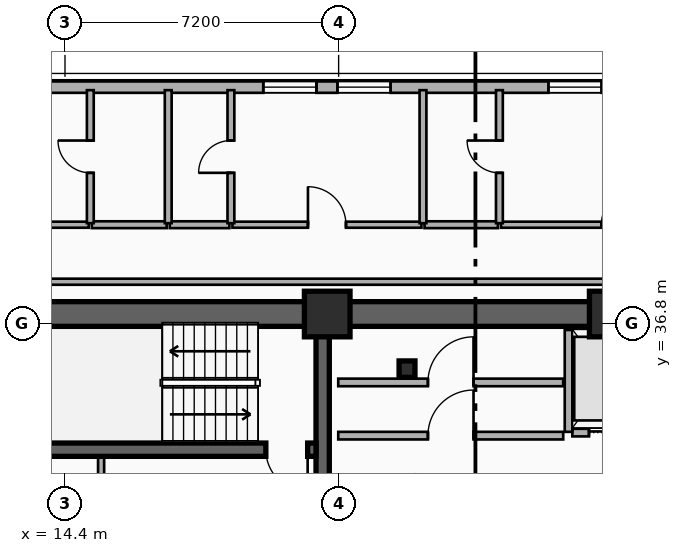
"""IFC4 building model, lengths in metres.
Left out: names, types, materials, properties, quantities, classifications, styles, units other than length and angle.
Written with IfcOpenShell. Run it as: python <this file> out.ifc"""

import sys

from ifc_helpers import new_model, si_unit, direction, frame, frame_2d, origin, origin_2d, place, context, subcontext, project, spatial, rectangle, i_section, extrude, element, fill, save


model = new_model("IFC4")
c1 = context("Model", 3, precision=1e-05, world=origin(), true_north=direction((0.0, 1.0)))
c2 = subcontext(c1, "Body", "Model", "MODEL_VIEW")
j1 = project(units=[si_unit("LENGTHUNIT", "METRE"), si_unit("PLANEANGLEUNIT", "RADIAN")], contexts=[c1])
p1 = place(None, origin())
s1 = spatial("IfcSite", under=j1, at=p1, CompositionType="ELEMENT")
p2 = place(p1, origin())
s2 = spatial("IfcBuilding", under=s1, at=p2, CompositionType="ELEMENT")
p3 = place(p2, frame((0.0, 0.0, 94.3)))
s3 = spatial("IfcBuildingStorey", under=s2, at=p3, CompositionType="ELEMENT", Elevation=94.3)
p4 = place(p3, frame((12.15, 37.05, 0.0), z_axis=(0.0, 0.0, 1.0), x_axis=(1.0, 0.0, 0.0)))
e1 = element("IfcWall", 1, at=p4, inside=s3, PredefinedType="SHEAR", context=c2, shape_type="SweptSolid", body=[
    extrude(rectangle(XDim=33.23, YDim=0.65, at=frame_2d((16.615, 0.0))), origin(), (0.0, 0.0, 1.0), 3.5),
])
p5 = place(p3, frame((21.18, 28.145, 0.0), z_axis=(0.0, 0.0, 1.0), x_axis=(0.0, 1.0, 0.0)))
e2 = element("IfcWall", 2, at=p5, inside=s3, PredefinedType="SHEAR", context=c2, shape_type="SweptSolid", body=[
    extrude(rectangle(XDim=8.58, YDim=0.35, at=frame_2d((4.29, 0.0))), origin(), (0.0, 0.0, 1.0), 3.5),
])
p6 = place(p3, frame((21.005, 33.48, 0.0), z_axis=(0.0, 0.0, 1.0), x_axis=(-1.0, 0.0, 0.0)))
e3 = element("IfcWall", 3, at=p6, inside=s3, PredefinedType="SHEAR", context=c2, shape_type="SweptSolid", body=[
    extrude(rectangle(XDim=8.53, YDim=0.35, at=frame_2d((4.265, 0.0))), origin(), (0.0, 0.0, 1.0), 3.5),
])
p7 = place(p6, frame((0.22, 0.0, 0.0)))
e4 = element("IfcOpeningElement", 4, at=p7, cuts=e3, PredefinedType="OPENING", context=c2, shape_type="SweptSolid", body=[
    extrude(rectangle(XDim=1.1, YDim=2.15, at=frame_2d((0.55, 1.075))), frame((0.0, 0.185, 0.0), z_axis=(0.0, -1.0, 0.0), x_axis=(1.0, 0.0, 0.0)), (0.0, 0.0, 1.0), 0.37),
])
p8 = place(p3, frame((23.4, 35.6, 0.0), z_axis=(0.0, 0.0, 1.0), x_axis=(1.0, 0.0, 0.0)))
e5 = element("IfcColumn", 5, at=p8, inside=s3, PredefinedType="COLUMN", context=c2, shape_type="SweptSolid", body=[
    extrude(i_section(OverallWidth=0.418, OverallDepth=0.432, WebThickness=0.035, FlangeThickness=0.056, FilletRadius=0.015, at=origin_2d()), origin(), (0.0, 0.0, 1.0), 3.5),
])
for number, where, z_axis, x_axis in (
    (6, (21.3, 37.05, 0.0), (0.0, 0.0, 1.0), (1.0, 0.0, 0.0)),
    (7, (28.8, 37.05, 0.0), (0.0, 0.0, 1.0), (1.0, 0.0, 0.0)),
):
    element("IfcColumn", number, at=place(p3, frame(where, z_axis=z_axis, x_axis=x_axis)), inside=s3, PredefinedType="COLUMN", context=c2, shape_type="SweptSolid", body=[
        extrude(rectangle(XDim=1.2, YDim=1.2, at=origin_2d()), origin(), (0.0, 0.0, 1.0), 3.5),
    ])
p9 = place(p3, frame((4.2, 43.02, 0.0), z_axis=(0.0, 0.0, 1.0), x_axis=(1.0, 0.0, 0.0)))
e8 = element("IfcWall", 8, at=p9, inside=s3, PredefinedType="SOLIDWALL", context=c2, shape_type="SweptSolid", body=[
    extrude(rectangle(XDim=49.2, YDim=0.3, at=frame_2d((24.6, 0.0))), origin(), (0.0, 0.0, 1.0), 3.24),
])
p10 = place(p9, frame((4.695, 0.0, 0.85)))
e9 = element("IfcOpeningElement", 9, at=p10, cuts=e8, PredefinedType="OPENING", context=c2, shape_type="SweptSolid", body=[
    extrude(rectangle(XDim=1.4, YDim=1.8, at=frame_2d((0.7, 0.9))), frame((0.0, 0.16, 0.0), z_axis=(0.0, -1.0, 0.0), x_axis=(1.0, 0.0, 0.0)), (0.0, 0.0, 1.0), 0.32),
])
p11 = place(p9, frame((7.631, 0.0, 0.85)))
e10 = element("IfcOpeningElement", 10, at=p11, cuts=e8, PredefinedType="OPENING", context=c2, shape_type="SweptSolid", body=[
    extrude(rectangle(XDim=1.4, YDim=1.8, at=frame_2d((0.7, 0.9))), frame((0.0, 0.16, 0.0), z_axis=(0.0, -1.0, 0.0), x_axis=(1.0, 0.0, 0.0)), (0.0, 0.0, 1.0), 0.32),
])
p12 = place(p9, frame((15.417, 0.0, 0.85)))
e11 = element("IfcOpeningElement", 11, at=p12, cuts=e8, PredefinedType="OPENING", context=c2, shape_type="SweptSolid", body=[
    extrude(rectangle(XDim=1.4, YDim=1.8, at=frame_2d((0.7, 0.9))), frame((0.0, 0.16, 0.0), z_axis=(0.0, -1.0, 0.0), x_axis=(1.0, 0.0, 0.0)), (0.0, 0.0, 1.0), 0.32),
])
p13 = place(p9, frame((17.369, 0.0, 0.85)))
e12 = element("IfcOpeningElement", 12, at=p13, cuts=e8, PredefinedType="OPENING", context=c2, shape_type="SweptSolid", body=[
    extrude(rectangle(XDim=1.4, YDim=1.8, at=frame_2d((0.7, 0.9))), frame((0.0, 0.16, 0.0), z_axis=(0.0, -1.0, 0.0), x_axis=(1.0, 0.0, 0.0)), (0.0, 0.0, 1.0), 0.32),
])
p14 = place(p9, frame((22.921, 0.0, 0.85)))
e13 = element("IfcOpeningElement", 13, at=p14, cuts=e8, PredefinedType="OPENING", context=c2, shape_type="SweptSolid", body=[
    extrude(rectangle(XDim=1.4, YDim=1.8, at=frame_2d((0.7, 0.9))), frame((0.0, 0.16, 0.0), z_axis=(0.0, -1.0, 0.0), x_axis=(1.0, 0.0, 0.0)), (0.0, 0.0, 1.0), 0.32),
])
p15 = place(p9, frame((25.31, 0.0, 0.85)))
e14 = element("IfcOpeningElement", 14, at=p15, cuts=e8, PredefinedType="OPENING", context=c2, shape_type="SweptSolid", body=[
    extrude(rectangle(XDim=1.4, YDim=1.8, at=frame_2d((0.7, 0.9))), frame((0.0, 0.16, 0.0), z_axis=(0.0, -1.0, 0.0), x_axis=(1.0, 0.0, 0.0)), (0.0, 0.0, 1.0), 0.32),
])
p16 = place(p9, frame((29.835, 0.0, 0.85)))
e15 = element("IfcOpeningElement", 15, at=p16, cuts=e8, PredefinedType="OPENING", context=c2, shape_type="SweptSolid", body=[
    extrude(rectangle(XDim=1.4, YDim=1.8, at=frame_2d((0.7, 0.9))), frame((0.0, 0.16, 0.0), z_axis=(0.0, -1.0, 0.0), x_axis=(1.0, 0.0, 0.0)), (0.0, 0.0, 1.0), 0.32),
])
p17 = place(p9, frame((32.771, 0.0, 0.85)))
e16 = element("IfcOpeningElement", 16, at=p17, cuts=e8, PredefinedType="OPENING", context=c2, shape_type="SweptSolid", body=[
    extrude(rectangle(XDim=1.4, YDim=1.8, at=frame_2d((0.7, 0.9))), frame((0.0, 0.16, 0.0), z_axis=(0.0, -1.0, 0.0), x_axis=(1.0, 0.0, 0.0)), (0.0, 0.0, 1.0), 0.32),
])
p18 = place(p9, frame((40.437, 0.0, 0.85)))
e17 = element("IfcOpeningElement", 17, at=p18, cuts=e8, PredefinedType="OPENING", context=c2, shape_type="SweptSolid", body=[
    extrude(rectangle(XDim=1.4, YDim=1.8, at=frame_2d((0.7, 0.9))), frame((0.0, 0.16, 0.0), z_axis=(0.0, -1.0, 0.0), x_axis=(1.0, 0.0, 0.0)), (0.0, 0.0, 1.0), 0.32),
])
p19 = place(p9, frame((42.269, 0.0, 0.85)))
e18 = element("IfcOpeningElement", 18, at=p19, cuts=e8, PredefinedType="OPENING", context=c2, shape_type="SweptSolid", body=[
    extrude(rectangle(XDim=1.4, YDim=1.8, at=frame_2d((0.7, 0.9))), frame((0.0, 0.16, 0.0), z_axis=(0.0, -1.0, 0.0), x_axis=(1.0, 0.0, 0.0)), (0.0, 0.0, 1.0), 0.32),
])
p20 = place(p9, frame((47.115, 0.0, 0.85)))
e19 = element("IfcOpeningElement", 19, at=p20, cuts=e8, PredefinedType="OPENING", context=c2, shape_type="SweptSolid", body=[
    extrude(rectangle(XDim=1.4, YDim=1.8, at=frame_2d((0.7, 0.9))), frame((0.0, 0.16, 0.0), z_axis=(0.0, -1.0, 0.0), x_axis=(1.0, 0.0, 0.0)), (0.0, 0.0, 1.0), 0.32),
])
p21 = place(p3, frame((27.75, 33.93, 0.0), z_axis=(0.0, 0.0, 1.0), x_axis=(1.0, 0.0, 0.0)))
e20 = element("IfcWall", 20, at=p21, inside=s3, PredefinedType="PARTITIONING", context=c2, shape_type="SweptSolid", body=[
    extrude(rectangle(XDim=1.975, YDim=0.2, at=frame_2d((0.988, 0.0))), origin(), (0.0, 0.0, 1.0), 2.212),
])
p22 = place(p21, frame((0.438, 0.0, 0.0)))
e21 = element("IfcOpeningElement", 21, at=p22, cuts=e20, PredefinedType="OPENING", context=c2, shape_type="SweptSolid", body=[
    extrude(rectangle(XDim=1.1, YDim=2.15, at=frame_2d((0.55, 1.075))), frame((0.0, 0.11, 0.0), z_axis=(0.0, -1.0, 0.0), x_axis=(1.0, 0.0, 0.0)), (0.0, 0.0, 1.0), 0.22),
])
p23 = place(p3, frame((27.65, 33.95, 0.0), z_axis=(0.0, 0.0, 1.0), x_axis=(0.0, 1.0, 0.0)))
e22 = element("IfcWall", 22, at=p23, inside=s3, PredefinedType="PARTITIONING", context=c2, shape_type="SweptSolid", body=[
    extrude(rectangle(XDim=2.68, YDim=0.2, at=frame_2d((1.34, 0.0))), origin(), (0.0, 0.0, 1.0), 2.212),
])
p24 = place(p3, frame((21.59, 33.85, 0.0), z_axis=(0.0, 0.0, 1.0), x_axis=(1.0, 0.0, 0.0)))
e23 = element("IfcWall", 23, at=p24, inside=s3, PredefinedType="PARTITIONING", context=c2, shape_type="SweptSolid", body=[
    extrude(rectangle(XDim=5.92, YDim=0.2, at=frame_2d((2.96, 0.0))), origin(), (0.0, 0.0, 1.0), 2.28),
])
p25 = place(p24, frame((2.36, 0.0, 0.0)))
e24 = element("IfcOpeningElement", 24, at=p25, cuts=e23, PredefinedType="OPENING", context=c2, shape_type="SweptSolid", body=[
    extrude(rectangle(XDim=1.2, YDim=2.15, at=frame_2d((0.6, 1.075))), frame((0.0, 0.11, 0.0), z_axis=(0.0, -1.0, 0.0), x_axis=(1.0, 0.0, 0.0)), (0.0, 0.0, 1.0), 0.22),
])
p26 = place(p3, frame((21.59, 35.25, 0.0), z_axis=(0.0, 0.0, 1.0), x_axis=(1.0, 0.0, 0.0)))
e25 = element("IfcWall", 25, at=p26, inside=s3, PredefinedType="PARTITIONING", context=c2, shape_type="SweptSolid", body=[
    extrude(rectangle(XDim=5.92, YDim=0.2, at=frame_2d((2.96, 0.0))), origin(), (0.0, 0.0, 1.0), 2.28),
])
p27 = place(p26, frame((2.36, 0.0, 0.0)))
e26 = element("IfcOpeningElement", 26, at=p27, cuts=e25, PredefinedType="OPENING", context=c2, shape_type="SweptSolid", body=[
    extrude(rectangle(XDim=1.2, YDim=2.15, at=frame_2d((0.6, 1.075))), frame((0.0, 0.11, 0.0), z_axis=(0.0, -1.0, 0.0), x_axis=(1.0, 0.0, 0.0)), (0.0, 0.0, 1.0), 0.22),
])
p28 = place(p3, frame((7.1, 39.4, 0.0), z_axis=(0.0, 0.0, 1.0), x_axis=(1.0, 0.0, 0.0)))
e27 = element("IfcWall", 27, at=p28, inside=s3, PredefinedType="PARTITIONING", context=c2, shape_type="SweptSolid", body=[
    extrude(rectangle(XDim=7.926, YDim=0.16, at=frame_2d((3.963, 0.0))), origin(), (0.0, 0.0, 1.0), 3.24),
])
p29 = place(p28, frame((3.463, 0.0, 0.0)))
e28 = element("IfcOpeningElement", 28, at=p29, cuts=e27, PredefinedType="OPENING", context=c2, shape_type="SweptSolid", body=[
    extrude(rectangle(XDim=1.0, YDim=2.15, at=frame_2d((0.5, 1.075))), frame((0.0, 0.09, 0.0), z_axis=(0.0, -1.0, 0.0), x_axis=(1.0, 0.0, 0.0)), (0.0, 0.0, 1.0), 0.18),
])
p30 = place(p3, frame((15.106, 39.4, 0.0), z_axis=(0.0, 0.0, 1.0), x_axis=(1.0, 0.0, 0.0)))
e29 = element("IfcWall", 29, at=p30, inside=s3, PredefinedType="PLUMBINGWALL", context=c2, shape_type="SweptSolid", body=[
    extrude(rectangle(XDim=1.97, YDim=0.18, at=frame_2d((0.985, 0.0))), origin(), (0.0, 0.0, 1.0), 3.24),
])
p31 = place(p3, frame((18.806, 39.4, 0.0), z_axis=(0.0, 0.0, 1.0), x_axis=(1.0, 0.0, 0.0)))
e30 = element("IfcWall", 30, at=p31, inside=s3, PredefinedType="PARTITIONING", context=c2, shape_type="SweptSolid", body=[
    extrude(rectangle(XDim=4.974, YDim=0.16, at=frame_2d((2.487, 0.0))), origin(), (0.0, 0.0, 1.0), 3.24),
])
p32 = place(p31, frame((1.987, 0.0, 0.0)))
e31 = element("IfcOpeningElement", 31, at=p32, cuts=e30, PredefinedType="OPENING", context=c2, shape_type="SweptSolid", body=[
    extrude(rectangle(XDim=1.0, YDim=2.15, at=frame_2d((0.5, 1.075))), frame((0.0, 0.09, 0.0), z_axis=(0.0, -1.0, 0.0), x_axis=(1.0, 0.0, 0.0)), (0.0, 0.0, 1.0), 0.18),
])
p33 = place(p3, frame((17.156, 39.4, 0.0), z_axis=(0.0, 0.0, 1.0), x_axis=(1.0, 0.0, 0.0)))
e32 = element("IfcWall", 32, at=p33, inside=s3, PredefinedType="PLUMBINGWALL", context=c2, shape_type="SweptSolid", body=[
    extrude(rectangle(XDim=1.57, YDim=0.18, at=frame_2d((0.785, 0.0))), origin(), (0.0, 0.0, 1.0), 3.24),
])
p34 = place(p3, frame((25.871, 39.4, 0.0), z_axis=(0.0, 0.0, 1.0), x_axis=(1.0, 0.0, 0.0)))
e33 = element("IfcWall", 33, at=p34, inside=s3, PredefinedType="PARTITIONING", context=c2, shape_type="SweptSolid", body=[
    extrude(rectangle(XDim=6.289, YDim=0.16, at=frame_2d((3.145, 0.0))), origin(), (0.0, 0.0, 1.0), 3.24),
])
p35 = place(p34, frame((2.645, 0.0, 0.0)))
e34 = element("IfcOpeningElement", 34, at=p35, cuts=e33, PredefinedType="OPENING", context=c2, shape_type="SweptSolid", body=[
    extrude(rectangle(XDim=1.0, YDim=2.15, at=frame_2d((0.5, 1.075))), frame((0.0, 0.09, 0.0), z_axis=(0.0, -1.0, 0.0), x_axis=(1.0, 0.0, 0.0)), (0.0, 0.0, 1.0), 0.18),
])
p36 = place(p3, frame((23.86, 39.4, 0.0), z_axis=(0.0, 0.0, 1.0), x_axis=(1.0, 0.0, 0.0)))
e35 = element("IfcWall", 35, at=p36, inside=s3, PredefinedType="PLUMBINGWALL", context=c2, shape_type="SweptSolid", body=[
    extrude(rectangle(XDim=1.931, YDim=0.18, at=frame_2d((0.965, 0.0))), origin(), (0.0, 0.0, 1.0), 3.24),
])
p37 = place(p3, frame((15.066, 39.44, 0.0), z_axis=(0.0, 0.0, 1.0), x_axis=(0.0, 1.0, 0.0)))
e36 = element("IfcWall", 36, at=p37, inside=s3, PredefinedType="PLUMBINGWALL", context=c2, shape_type="SweptSolid", body=[
    extrude(rectangle(XDim=3.5, YDim=0.18, at=frame_2d((1.75, 0.0))), origin(), (0.0, 0.0, 1.0), 3.24),
])
p38 = place(p37, frame((1.325, 0.0, 0.0)))
e37 = element("IfcOpeningElement", 37, at=p38, cuts=e36, PredefinedType="OPENING", context=c2, shape_type="SweptSolid", body=[
    extrude(rectangle(XDim=0.85, YDim=2.1, at=frame_2d((0.425, 1.05))), frame((0.0, 0.1, 0.0), z_axis=(0.0, -1.0, 0.0), x_axis=(1.0, 0.0, 0.0)), (0.0, 0.0, 1.0), 0.2),
])
p39 = place(p3, frame((17.116, 39.44, 0.0), z_axis=(0.0, 0.0, 1.0), x_axis=(0.0, 1.0, 0.0)))
e38 = element("IfcWall", 38, at=p39, inside=s3, PredefinedType="PLUMBINGWALL", context=c2, shape_type="SweptSolid", body=[
    extrude(rectangle(XDim=3.5, YDim=0.18, at=frame_2d((1.75, 0.0))), origin(), (0.0, 0.0, 1.0), 3.24),
])
p40 = place(p3, frame((18.766, 39.44, 0.0), z_axis=(0.0, 0.0, 1.0), x_axis=(0.0, 1.0, 0.0)))
e39 = element("IfcWall", 39, at=p40, inside=s3, PredefinedType="PLUMBINGWALL", context=c2, shape_type="SweptSolid", body=[
    extrude(rectangle(XDim=3.5, YDim=0.18, at=frame_2d((1.75, 0.0))), origin(), (0.0, 0.0, 1.0), 3.24),
])
p41 = place(p40, frame((1.325, 0.0, 0.0)))
e40 = element("IfcOpeningElement", 40, at=p41, cuts=e39, PredefinedType="OPENING", context=c2, shape_type="SweptSolid", body=[
    extrude(rectangle(XDim=0.85, YDim=2.1, at=frame_2d((0.425, 1.05))), frame((0.0, 0.1, 0.0), z_axis=(0.0, -1.0, 0.0), x_axis=(1.0, 0.0, 0.0)), (0.0, 0.0, 1.0), 0.2),
])
p42 = place(p3, frame((23.82, 39.44, 0.0), z_axis=(0.0, 0.0, 1.0), x_axis=(0.0, 1.0, 0.0)))
e41 = element("IfcWall", 41, at=p42, inside=s3, PredefinedType="PLUMBINGWALL", context=c2, shape_type="SweptSolid", body=[
    extrude(rectangle(XDim=3.5, YDim=0.18, at=frame_2d((1.75, 0.0))), origin(), (0.0, 0.0, 1.0), 3.24),
])
p43 = place(p3, frame((25.831, 39.44, 0.0), z_axis=(0.0, 0.0, 1.0), x_axis=(0.0, 1.0, 0.0)))
e42 = element("IfcWall", 42, at=p43, inside=s3, PredefinedType="PLUMBINGWALL", context=c2, shape_type="SweptSolid", body=[
    extrude(rectangle(XDim=3.5, YDim=0.18, at=frame_2d((1.75, 0.0))), origin(), (0.0, 0.0, 1.0), 3.24),
])
p44 = place(p43, frame((1.325, 0.0, 0.0)))
e43 = element("IfcOpeningElement", 43, at=p44, cuts=e42, PredefinedType="OPENING", context=c2, shape_type="SweptSolid", body=[
    extrude(rectangle(XDim=0.85, YDim=2.1, at=frame_2d((0.425, 1.05))), frame((0.0, 0.1, 0.0), z_axis=(0.0, -1.0, 0.0), x_axis=(1.0, 0.0, 0.0)), (0.0, 0.0, 1.0), 0.2),
])
p45 = place(p3, frame((15.35, 30.96, 0.0), z_axis=(0.0, 0.0, 1.0), x_axis=(0.0, 1.0, 0.0)))
e44 = element("IfcWall", 44, at=p45, inside=s3, PredefinedType="PARTITIONING", context=c2, shape_type="SweptSolid", body=[
    extrude(rectangle(XDim=2.31, YDim=0.16, at=frame_2d((1.155, 0.0))), origin(), (0.0, 0.0, 1.0), 3.24),
])
p46 = place(p3, frame((11.28, 37.9, 0.0), z_axis=(0.0, 0.0, 1.0), x_axis=(1.0, 0.0, 0.0)))
e45 = element("IfcWall", 45, at=p46, inside=s3, PredefinedType="PARTITIONING", context=c2, shape_type="SweptSolid", body=[
    extrude(rectangle(XDim=35.04, YDim=0.16, at=frame_2d((17.52, 0.0))), origin(), (0.0, 0.0, 1.0), 3.24),
])
p47 = place(p12, origin())
e46 = element("IfcWindow", 46, at=p47, inside=s3, PartitioningType="SINGLE_PANEL", PredefinedType="WINDOW", context=c2, shape_type="SweptSolid", body=[
    extrude(rectangle(XDim=1.4, YDim=1.8, at=frame_2d((0.7, 0.9))), frame((0.0, 0.03, 0.0), z_axis=(0.0, -1.0, 0.0), x_axis=(1.0, 0.0, 0.0)), (0.0, 0.0, 1.0), 0.06),
])
fill(e11, e46)
p48 = place(p13, origin())
e47 = element("IfcWindow", 47, at=p48, inside=s3, PartitioningType="SINGLE_PANEL", PredefinedType="WINDOW", context=c2, shape_type="SweptSolid", body=[
    extrude(rectangle(XDim=1.4, YDim=1.8, at=frame_2d((0.7, 0.9))), frame((0.0, 0.03, 0.0), z_axis=(0.0, -1.0, 0.0), x_axis=(1.0, 0.0, 0.0)), (0.0, 0.0, 1.0), 0.06),
])
fill(e12, e47)
p49 = place(p14, origin())
e48 = element("IfcWindow", 48, at=p49, inside=s3, PartitioningType="SINGLE_PANEL", PredefinedType="WINDOW", context=c2, shape_type="SweptSolid", body=[
    extrude(rectangle(XDim=1.4, YDim=1.8, at=frame_2d((0.7, 0.9))), frame((0.0, 0.03, 0.0), z_axis=(0.0, -1.0, 0.0), x_axis=(1.0, 0.0, 0.0)), (0.0, 0.0, 1.0), 0.06),
])
fill(e13, e48)
p50 = place(p22, origin())
e49 = element("IfcDoor", 49, at=p50, inside=s3, OperationType="DOUBLE_DOOR_SLIDING", PredefinedType="DOOR", context=c2, shape_type="SweptSolid", body=[
    extrude(rectangle(XDim=1.1, YDim=2.15, at=frame_2d((0.55, 1.075))), frame((0.0, 0.025, 0.0), z_axis=(0.0, -1.0, 0.0), x_axis=(1.0, 0.0, 0.0)), (0.0, 0.0, 1.0), 0.05),
])
fill(e21, e49)
p51 = place(p7, origin())
e50 = element("IfcDoor", 50, at=p51, inside=s3, OperationType="SINGLE_SWING_LEFT", PredefinedType="DOOR", context=c2, shape_type="SweptSolid", body=[
    extrude(rectangle(XDim=1.1, YDim=2.15, at=frame_2d((0.55, 1.075))), frame((0.0, 0.025, 0.0), z_axis=(0.0, -1.0, 0.0), x_axis=(1.0, 0.0, 0.0)), (0.0, 0.0, 1.0), 0.05),
])
fill(e4, e50)
p52 = place(p25, origin())
e51 = element("IfcDoor", 51, at=p52, inside=s3, OperationType="SINGLE_SWING_RIGHT", PredefinedType="DOOR", context=c2, shape_type="SweptSolid", body=[
    extrude(rectangle(XDim=1.2, YDim=2.15, at=frame_2d((0.6, 1.075))), frame((0.0, 0.025, 0.0), z_axis=(0.0, -1.0, 0.0), x_axis=(1.0, 0.0, 0.0)), (0.0, 0.0, 1.0), 0.05),
])
fill(e24, e51)
p53 = place(p27, origin())
e52 = element("IfcDoor", 52, at=p53, inside=s3, OperationType="SINGLE_SWING_RIGHT", PredefinedType="DOOR", context=c2, shape_type="SweptSolid", body=[
    extrude(rectangle(XDim=1.2, YDim=2.15, at=frame_2d((0.6, 1.075))), frame((0.0, 0.025, 0.0), z_axis=(0.0, -1.0, 0.0), x_axis=(1.0, 0.0, 0.0)), (0.0, 0.0, 1.0), 0.05),
])
fill(e26, e52)
p54 = place(p32, origin())
e53 = element("IfcDoor", 53, at=p54, inside=s3, OperationType="SINGLE_SWING_LEFT", PredefinedType="DOOR", context=c2, shape_type="SweptSolid", body=[
    extrude(rectangle(XDim=1.0, YDim=2.15, at=frame_2d((0.5, 1.075))), frame((0.0, 0.025, 0.0), z_axis=(0.0, -1.0, 0.0), x_axis=(1.0, 0.0, 0.0)), (0.0, 0.0, 1.0), 0.05),
])
fill(e31, e53)
p55 = place(p35, origin())
e54 = element("IfcDoor", 54, at=p55, inside=s3, OperationType="SINGLE_SWING_RIGHT", PredefinedType="DOOR", context=c2, shape_type="SweptSolid", body=[
    extrude(rectangle(XDim=1.0, YDim=2.15, at=frame_2d((0.5, 1.075))), frame((0.0, 0.025, 0.0), z_axis=(0.0, -1.0, 0.0), x_axis=(1.0, 0.0, 0.0)), (0.0, 0.0, 1.0), 0.05),
])
fill(e34, e54)
p56 = place(p38, origin())
e55 = element("IfcDoor", 55, at=p56, inside=s3, OperationType="SINGLE_SWING_RIGHT", PredefinedType="DOOR", context=c2, shape_type="SweptSolid", body=[
    extrude(rectangle(XDim=0.85, YDim=2.1, at=frame_2d((0.425, 1.05))), frame((0.0, 0.025, 0.0), z_axis=(0.0, -1.0, 0.0), x_axis=(1.0, 0.0, 0.0)), (0.0, 0.0, 1.0), 0.05),
])
fill(e37, e55)
p57 = place(p41, origin())
e56 = element("IfcDoor", 56, at=p57, inside=s3, OperationType="SINGLE_SWING_LEFT", PredefinedType="DOOR", context=c2, shape_type="SweptSolid", body=[
    extrude(rectangle(XDim=0.85, YDim=2.1, at=frame_2d((0.425, 1.05))), frame((0.0, 0.025, 0.0), z_axis=(0.0, -1.0, 0.0), x_axis=(1.0, 0.0, 0.0)), (0.0, 0.0, 1.0), 0.05),
])
fill(e40, e56)
p58 = place(p44, origin())
e57 = element("IfcDoor", 57, at=p58, inside=s3, OperationType="SINGLE_SWING_RIGHT", PredefinedType="DOOR", context=c2, shape_type="SweptSolid", body=[
    extrude(rectangle(XDim=0.85, YDim=2.1, at=frame_2d((0.425, 1.05))), frame((0.0, 0.025, 0.0), z_axis=(0.0, -1.0, 0.0), x_axis=(1.0, 0.0, 0.0)), (0.0, 0.0, 1.0), 0.05),
])
fill(e43, e57)
save(model, sys.argv[1])
